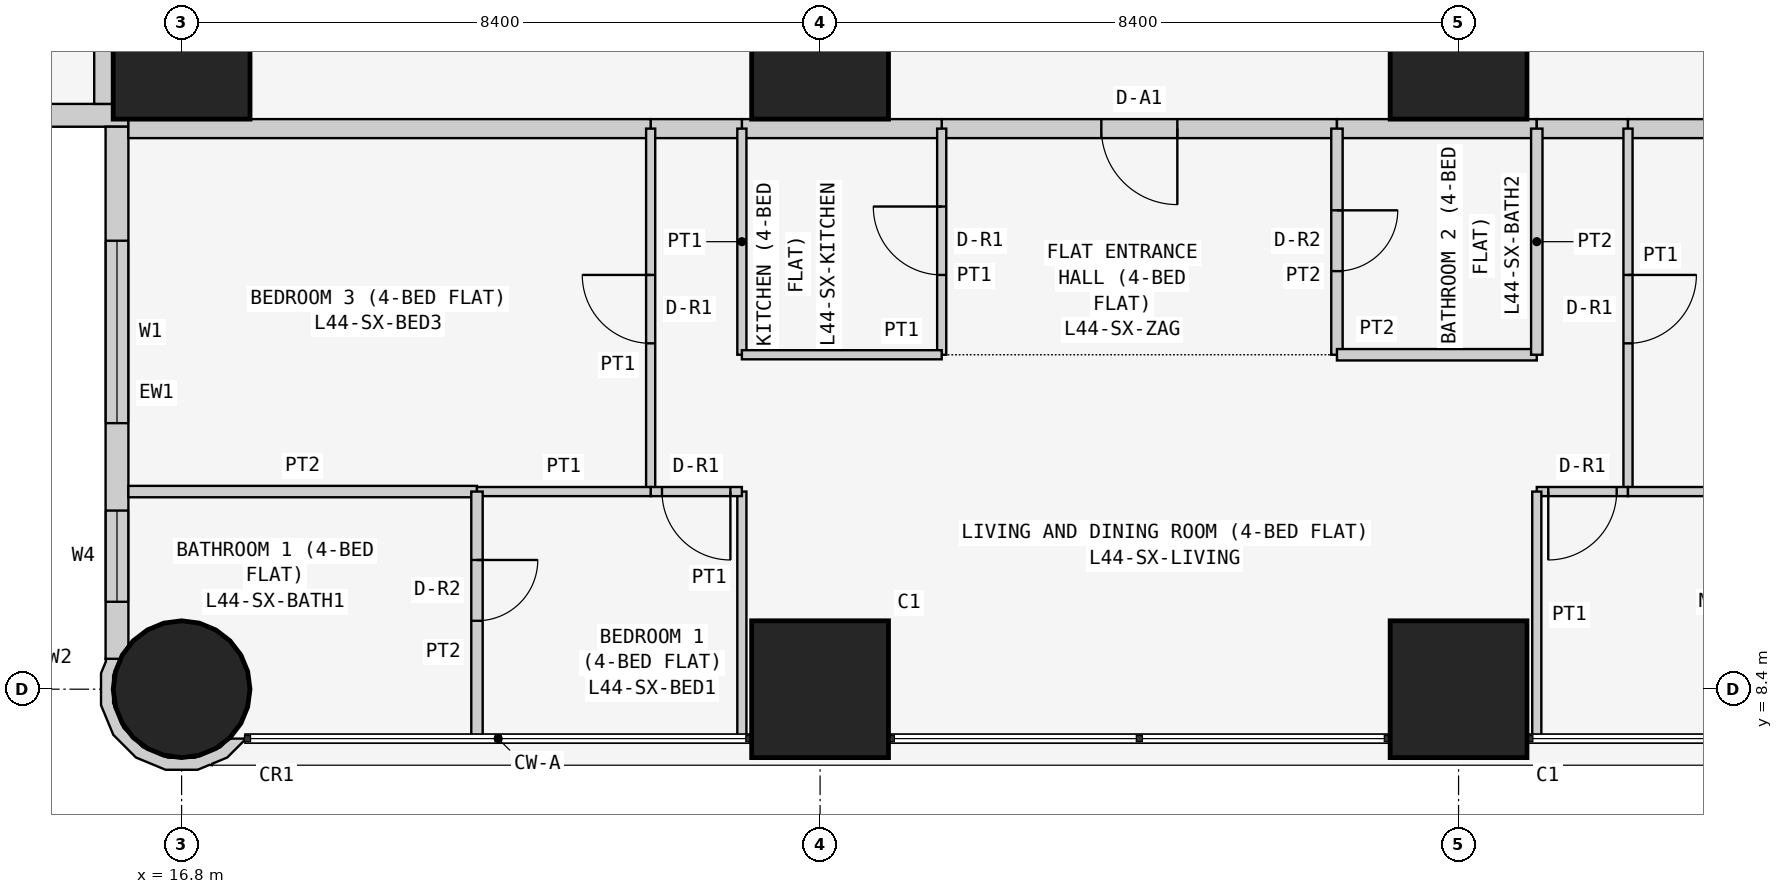
"""IFC4 building model, lengths in metres.
Left out: names, types, materials, properties, quantities, classifications, styles, units other than length and angle.
Written with IfcOpenShell. Run it as: python <this file> out.ifc"""

import sys

from ifc_helpers import new_model, si_unit, direction, frame, frame_2d, origin, origin_2d, place, context, subcontext, project, spatial, polyline, rectangle, circle, outline, extrude, element, fill, save


model = new_model("IFC4")
c1 = context("Model", 3, precision=1e-05, world=origin(), true_north=direction((0.0, 1.0)))
c2 = subcontext(c1, "Body", "Model", "MODEL_VIEW")
j1 = project(units=[si_unit("LENGTHUNIT", "METRE"), si_unit("PLANEANGLEUNIT", "RADIAN")], contexts=[c1])
p1 = place(None, origin())
s1 = spatial("IfcSite", under=j1, at=p1, CompositionType="ELEMENT")
p2 = place(p1, origin())
s2 = spatial("IfcBuilding", under=s1, at=p2, CompositionType="ELEMENT")
p3 = place(p2, frame((0.0, 0.0, 170.1)))
s3 = spatial("IfcBuildingStorey", under=s2, at=p3, CompositionType="ELEMENT", Elevation=170.1)
p4 = place(p3, frame((16.8, 8.4, 0.0), z_axis=(0.0, 0.0, 1.0), x_axis=(1.0, 0.0, 0.0)))
e1 = element("IfcColumn", 1, at=p4, inside=s3, PredefinedType="COLUMN", context=c2, shape_type="SweptSolid", body=[
    extrude(circle(Radius=0.9, at=origin_2d()), origin(), (0.0, 0.0, 1.0), 3.6),
])
for number, where, z_axis, x_axis in (
    (2, (16.8, 16.8, 0.0), (0.0, 0.0, 1.0), (1.0, 0.0, 0.0)),
    (3, (25.2, 8.4, 0.0), (0.0, 0.0, 1.0), (1.0, 0.0, 0.0)),
    (4, (25.2, 16.8, 0.0), (0.0, 0.0, 1.0), (1.0, 0.0, 0.0)),
    (5, (33.6, 8.4, 0.0), (0.0, 0.0, 1.0), (1.0, 0.0, 0.0)),
    (6, (33.6, 16.8, 0.0), (0.0, 0.0, 1.0), (1.0, 0.0, 0.0)),
):
    element("IfcColumn", number, at=place(p3, frame(where, z_axis=z_axis, x_axis=x_axis)), inside=s3, PredefinedType="COLUMN", context=c2, shape_type="SweptSolid", body=[
        extrude(rectangle(XDim=1.8, YDim=1.8, at=origin_2d()), origin(), (0.0, 0.0, 1.0), 3.6),
    ])
p5 = place(p3, frame((0.4, 15.95, 0.0), z_axis=(0.0, 0.0, 1.0), x_axis=(1.0, 0.0, 0.0)))
e7 = element("IfcWall", 7, at=p5, inside=s3, PredefinedType="SOLIDWALL", context=c2, shape_type="SweptSolid", body=[
    extrude(rectangle(XDim=15.7, YDim=0.3, at=frame_2d((7.85, 0.0))), origin(), (0.0, 0.0, 1.0), 3.45),
])
p6 = place(p5, frame((12.4, 0.0, 0.9)))
e8 = element("IfcOpeningElement", 8, at=p6, cuts=e7, PredefinedType="OPENING", context=c2, shape_type="SweptSolid", body=[
    extrude(rectangle(XDim=1.8, YDim=1.5, at=frame_2d((0.9, 0.75))), frame((0.0, 0.16, 0.0), z_axis=(0.0, -1.0, 0.0), x_axis=(1.0, 0.0, 0.0)), (0.0, 0.0, 1.0), 0.32),
])
p7 = place(p5, frame((9.55, 0.0, 1.5)))
e9 = element("IfcOpeningElement", 9, at=p7, cuts=e7, PredefinedType="OPENING", context=c2, shape_type="SweptSolid", body=[
    extrude(rectangle(XDim=0.9, YDim=0.7, at=frame_2d((0.45, 0.35))), frame((0.0, 0.16, 0.0), z_axis=(0.0, -1.0, 0.0), x_axis=(1.0, 0.0, 0.0)), (0.0, 0.0, 1.0), 0.32),
])
p8 = place(p5, frame((5.1, 0.0, 0.9)))
e10 = element("IfcOpeningElement", 10, at=p8, cuts=e7, PredefinedType="OPENING", context=c2, shape_type="SweptSolid", body=[
    extrude(rectangle(XDim=1.8, YDim=1.5, at=frame_2d((0.9, 0.75))), frame((0.0, 0.16, 0.0), z_axis=(0.0, -1.0, 0.0), x_axis=(1.0, 0.0, 0.0)), (0.0, 0.0, 1.0), 0.32),
])
p9 = place(p5, frame((2.0, 0.0, 0.0)))
e11 = element("IfcOpeningElement", 11, at=p9, cuts=e7, PredefinedType="OPENING", context=c2, shape_type="SweptSolid", body=[
    extrude(rectangle(XDim=0.9, YDim=2.4, at=frame_2d((0.45, 1.2))), frame((0.0, 0.16, 0.0), z_axis=(0.0, -1.0, 0.0), x_axis=(1.0, 0.0, 0.0)), (0.0, 0.0, 1.0), 0.32),
])
p10 = place(p5, frame((0.7, 0.0, 0.9)))
e12 = element("IfcOpeningElement", 12, at=p10, cuts=e7, PredefinedType="OPENING", context=c2, shape_type="SweptSolid", body=[
    extrude(rectangle(XDim=1.2, YDim=1.5, at=frame_2d((0.6, 0.75))), frame((0.0, 0.16, 0.0), z_axis=(0.0, -1.0, 0.0), x_axis=(1.0, 0.0, 0.0)), (0.0, 0.0, 1.0), 0.32),
])
p11 = place(p3, frame((15.95, 15.8, 0.0), z_axis=(0.0, 0.0, 1.0), x_axis=(0.0, -1.0, 0.0)))
e13 = element("IfcWall", 13, at=p11, inside=s3, PredefinedType="SOLIDWALL", context=c2, shape_type="SweptSolid", body=[
    extrude(rectangle(XDim=7.0, YDim=0.3, at=frame_2d((3.5, 0.0))), origin(), (0.0, 0.0, 1.0), 3.45),
])
p12 = place(p11, frame((1.5, 0.0, 0.9)))
e14 = element("IfcOpeningElement", 14, at=p12, cuts=e13, PredefinedType="OPENING", context=c2, shape_type="SweptSolid", body=[
    extrude(rectangle(XDim=2.4, YDim=1.5, at=frame_2d((1.2, 0.75))), frame((0.0, 0.16, 0.0), z_axis=(0.0, -1.0, 0.0), x_axis=(1.0, 0.0, 0.0)), (0.0, 0.0, 1.0), 0.32),
])
p13 = place(p11, frame((5.05, 0.0, 0.9)))
e15 = element("IfcOpeningElement", 15, at=p13, cuts=e13, PredefinedType="OPENING", context=c2, shape_type="SweptSolid", body=[
    extrude(rectangle(XDim=1.2, YDim=1.5, at=frame_2d((0.6, 0.75))), frame((0.0, 0.16, 0.0), z_axis=(0.0, -1.0, 0.0), x_axis=(1.0, 0.0, 0.0)), (0.0, 0.0, 1.0), 0.32),
])
p14 = place(p3, frame((15.89, 8.764, 0.0), z_axis=(0.0, 0.0, 1.0), x_axis=(-0.377204953059, -0.926129809145, 0.0)))
e16 = element("IfcWall", 16, at=p14, inside=s3, PredefinedType="SOLIDWALL", context=c2, shape_type="SweptSolid", body=[
    extrude(outline(polyline([(0.36, 1.803), (0.509, 1.741), (0.761, 1.486), (0.896, 1.154), (0.894, 0.795), (0.755, 0.465), (0.5, 0.213), (0.168, 0.078), (-0.1, 0.08), (0.001, -0.097), (0.03, -0.08), (0.198, -0.081), (0.589, 0.078), (0.889, 0.374), (1.052, 0.763), (1.055, 1.184), (0.896, 1.575), (0.778, 1.695), (0.769, 1.728), (0.75, 1.723), (0.6, 1.875), (0.295, 2.004), (0.281, 1.998), (0.36, 1.803)])), origin(), (0.0, 0.0, 1.0), 3.45),
])
p15 = place(p3, frame((32.0, 15.775, 0.0), z_axis=(0.0, 0.0, 1.0), x_axis=(-1.0, 0.0, 0.0)))
e17 = element("IfcWall", 17, at=p15, inside=s3, PredefinedType="PARTITIONING", context=c2, shape_type="SweptSolid", body=[
    extrude(rectangle(XDim=5.2, YDim=0.25, at=frame_2d((2.6, 0.0))), origin(), (0.0, 0.0, 1.0), 3.45),
])
p16 = place(p15, frame((2.1, 0.0, 0.0)))
e18 = element("IfcOpeningElement", 18, at=p16, cuts=e17, PredefinedType="OPENING", context=c2, shape_type="SweptSolid", body=[
    extrude(rectangle(XDim=1.0, YDim=2.1, at=frame_2d((0.5, 1.05))), frame((0.0, 0.135, 0.0), z_axis=(0.0, -1.0, 0.0), x_axis=(1.0, 0.0, 0.0)), (0.0, 0.0, 1.0), 0.27),
])
p17 = place(p3, frame((34.629, 15.775, 0.0), z_axis=(0.0, 0.0, 1.0), x_axis=(-1.0, 0.0, 0.0)))
e19 = element("IfcWall", 19, at=p17, inside=s3, PredefinedType="PARTITIONING", context=c2, shape_type="SweptSolid", body=[
    extrude(rectangle(XDim=2.629, YDim=0.25, at=frame_2d((1.314, 0.0))), origin(), (0.0, 0.0, 1.0), 3.45),
])
p18 = place(p3, frame((26.8, 15.775, 0.0), z_axis=(0.0, 0.0, 1.0), x_axis=(-1.0, 0.0, 0.0)))
e20 = element("IfcWall", 20, at=p18, inside=s3, PredefinedType="PARTITIONING", context=c2, shape_type="SweptSolid", body=[
    extrude(rectangle(XDim=2.629, YDim=0.25, at=frame_2d((1.314, 0.0))), origin(), (0.0, 0.0, 1.0), 3.45),
])
p19 = place(p3, frame((24.171, 15.775, 0.0), z_axis=(0.0, 0.0, 1.0), x_axis=(-1.0, 0.0, 0.0)))
e21 = element("IfcWall", 21, at=p19, inside=s3, PredefinedType="PARTITIONING", context=c2, shape_type="SweptSolid", body=[
    extrude(rectangle(XDim=1.2, YDim=0.25, at=frame_2d((0.6, 0.0))), origin(), (0.0, 0.0, 1.0), 3.45),
])
p20 = place(p3, frame((35.829, 15.775, 0.0), z_axis=(0.0, 0.0, 1.0), x_axis=(-1.0, 0.0, 0.0)))
e22 = element("IfcWall", 22, at=p20, inside=s3, PredefinedType="PARTITIONING", context=c2, shape_type="SweptSolid", body=[
    extrude(rectangle(XDim=1.2, YDim=0.25, at=frame_2d((0.6, 0.0))), origin(), (0.0, 0.0, 1.0), 3.45),
])
for number, where, z_axis, x_axis in (
    (23, (42.7, 15.775, 0.0), (0.0, 0.0, 1.0), (-1.0, 0.0, 0.0)),
    (24, (22.971, 15.775, 0.0), (0.0, 0.0, 1.0), (-1.0, 0.0, 0.0)),
    (25, (15.775, 16.1, 0.0), (0.0, 0.0, 1.0), (0.0, 1.0, 0.0)),
):
    element("IfcWall", number, at=place(p3, frame(where, z_axis=z_axis, x_axis=x_axis)), inside=s3, PredefinedType="PARTITIONING", context=c2, shape_type="SweptSolid", body=[
        extrude(rectangle(XDim=6.871, YDim=0.25, at=frame_2d((3.436, 0.0))), origin(), (0.0, 0.0, 1.0), 3.45),
    ])
p21 = place(p3, frame((32.0, 12.8, 0.0), z_axis=(0.0, 0.0, 1.0), x_axis=(0.0, 1.0, 0.0)))
e26 = element("IfcWall", 26, at=p21, inside=s3, PredefinedType="PARTITIONING", context=c2, shape_type="SweptSolid", body=[
    extrude(rectangle(XDim=2.975, YDim=0.15, at=frame_2d((1.487, 0.0))), origin(), (0.0, 0.0, 1.0), 3.45),
])
p22 = place(p21, frame((1.1, 0.0, 0.0)))
e27 = element("IfcOpeningElement", 27, at=p22, cuts=e26, PredefinedType="OPENING", context=c2, shape_type="SweptSolid", body=[
    extrude(rectangle(XDim=0.8, YDim=2.1, at=frame_2d((0.4, 1.05))), frame((0.0, 0.085, 0.0), z_axis=(0.0, -1.0, 0.0), x_axis=(1.0, 0.0, 0.0)), (0.0, 0.0, 1.0), 0.17),
])
p23 = place(p3, frame((26.8, 15.775, 0.0), z_axis=(0.0, 0.0, 1.0), x_axis=(0.0, -1.0, 0.0)))
e28 = element("IfcWall", 28, at=p23, inside=s3, PredefinedType="PARTITIONING", context=c2, shape_type="SweptSolid", body=[
    extrude(rectangle(XDim=2.975, YDim=0.12, at=frame_2d((1.487, 0.0))), origin(), (0.0, 0.0, 1.0), 3.45),
])
p24 = place(p23, frame((1.025, 0.0, 0.0)))
e29 = element("IfcOpeningElement", 29, at=p24, cuts=e28, PredefinedType="OPENING", context=c2, shape_type="SweptSolid", body=[
    extrude(rectangle(XDim=0.9, YDim=2.1, at=frame_2d((0.45, 1.05))), frame((0.0, 0.07, 0.0), z_axis=(0.0, -1.0, 0.0), x_axis=(1.0, 0.0, 0.0)), (0.0, 0.0, 1.0), 0.14),
])
p25 = place(p3, frame((32.0, 12.8, 0.0), z_axis=(0.0, 0.0, 1.0), x_axis=(1.0, 0.0, 0.0)))
e30 = element("IfcWall", 30, at=p25, inside=s3, PredefinedType="PARTITIONING", context=c2, shape_type="SweptSolid", body=[
    extrude(rectangle(XDim=2.629, YDim=0.15, at=frame_2d((1.314, 0.0))), origin(), (0.0, 0.0, 1.0), 3.45),
])
p26 = place(p3, frame((34.629, 12.8, 0.0), z_axis=(0.0, 0.0, 1.0), x_axis=(0.0, 1.0, 0.0)))
e31 = element("IfcWall", 31, at=p26, inside=s3, PredefinedType="PARTITIONING", context=c2, shape_type="SweptSolid", body=[
    extrude(rectangle(XDim=2.975, YDim=0.15, at=frame_2d((1.487, 0.0))), origin(), (0.0, 0.0, 1.0), 3.45),
])
p27 = place(p3, frame((24.171, 15.775, 0.0), z_axis=(0.0, 0.0, 1.0), x_axis=(0.0, -1.0, 0.0)))
e32 = element("IfcWall", 32, at=p27, inside=s3, PredefinedType="PARTITIONING", context=c2, shape_type="SweptSolid", body=[
    extrude(rectangle(XDim=2.975, YDim=0.12, at=frame_2d((1.487, 0.0))), origin(), (0.0, 0.0, 1.0), 3.45),
])
p28 = place(p3, frame((24.171, 12.8, 0.0), z_axis=(0.0, 0.0, 1.0), x_axis=(1.0, 0.0, 0.0)))
e33 = element("IfcWall", 33, at=p28, inside=s3, PredefinedType="PARTITIONING", context=c2, shape_type="SweptSolid", body=[
    extrude(rectangle(XDim=2.629, YDim=0.12, at=frame_2d((1.314, 0.0))), origin(), (0.0, 0.0, 1.0), 3.45),
])
p29 = place(p3, frame((35.829, 15.775, 0.0), z_axis=(0.0, 0.0, 1.0), x_axis=(0.0, -1.0, 0.0)))
e34 = element("IfcWall", 34, at=p29, inside=s3, PredefinedType="PARTITIONING", context=c2, shape_type="SweptSolid", body=[
    extrude(rectangle(XDim=4.775, YDim=0.12, at=frame_2d((2.387, 0.0))), origin(), (0.0, 0.0, 1.0), 3.45),
])
p30 = place(p29, frame((1.925, 0.0, 0.0)))
e35 = element("IfcOpeningElement", 35, at=p30, cuts=e34, PredefinedType="OPENING", context=c2, shape_type="SweptSolid", body=[
    extrude(rectangle(XDim=0.9, YDim=2.1, at=frame_2d((0.45, 1.05))), frame((0.0, 0.07, 0.0), z_axis=(0.0, -1.0, 0.0), x_axis=(1.0, 0.0, 0.0)), (0.0, 0.0, 1.0), 0.14),
])
p31 = place(p3, frame((35.829, 11.0, 0.0), z_axis=(0.0, 0.0, 1.0), x_axis=(-1.0, 0.0, 0.0)))
e36 = element("IfcWall", 36, at=p31, inside=s3, PredefinedType="PARTITIONING", context=c2, shape_type="SweptSolid", body=[
    extrude(rectangle(XDim=1.2, YDim=0.12, at=frame_2d((0.6, 0.0))), origin(), (0.0, 0.0, 1.0), 3.45),
])
p32 = place(p31, frame((0.149, 0.0, 0.0)))
e37 = element("IfcOpeningElement", 37, at=p32, cuts=e36, PredefinedType="OPENING", context=c2, shape_type="SweptSolid", body=[
    extrude(rectangle(XDim=0.9, YDim=2.1, at=frame_2d((0.45, 1.05))), frame((0.0, 0.07, 0.0), z_axis=(0.0, -1.0, 0.0), x_axis=(1.0, 0.0, 0.0)), (0.0, 0.0, 1.0), 0.14),
])
p33 = place(p3, frame((34.629, 11.0, 0.0), z_axis=(0.0, 0.0, 1.0), x_axis=(0.0, -1.0, 0.0)))
e38 = element("IfcWall", 38, at=p33, inside=s3, PredefinedType="PARTITIONING", context=c2, shape_type="SweptSolid", body=[
    extrude(rectangle(XDim=3.25, YDim=0.12, at=frame_2d((1.625, 0.0))), origin(), (0.0, 0.0, 1.0), 3.45),
])
p34 = place(p3, frame((22.971, 11.0, 0.0), z_axis=(0.0, 0.0, 1.0), x_axis=(0.0, 1.0, 0.0)))
e39 = element("IfcWall", 39, at=p34, inside=s3, PredefinedType="PARTITIONING", context=c2, shape_type="SweptSolid", body=[
    extrude(rectangle(XDim=4.775, YDim=0.12, at=frame_2d((2.387, 0.0))), origin(), (0.0, 0.0, 1.0), 3.45),
])
p35 = place(p34, frame((1.95, 0.0, 0.0)))
e40 = element("IfcOpeningElement", 40, at=p35, cuts=e39, PredefinedType="OPENING", context=c2, shape_type="SweptSolid", body=[
    extrude(rectangle(XDim=0.9, YDim=2.1, at=frame_2d((0.45, 1.05))), frame((0.0, 0.07, 0.0), z_axis=(0.0, -1.0, 0.0), x_axis=(1.0, 0.0, 0.0)), (0.0, 0.0, 1.0), 0.14),
])
p36 = place(p3, frame((24.171, 7.75, 0.0), z_axis=(0.0, 0.0, 1.0), x_axis=(0.0, 1.0, 0.0)))
e41 = element("IfcWall", 41, at=p36, inside=s3, PredefinedType="PARTITIONING", context=c2, shape_type="SweptSolid", body=[
    extrude(rectangle(XDim=3.25, YDim=0.12, at=frame_2d((1.625, 0.0))), origin(), (0.0, 0.0, 1.0), 3.45),
])
p37 = place(p3, frame((24.171, 11.0, 0.0), z_axis=(0.0, 0.0, 1.0), x_axis=(-1.0, 0.0, 0.0)))
e42 = element("IfcWall", 42, at=p37, inside=s3, PredefinedType="PARTITIONING", context=c2, shape_type="SweptSolid", body=[
    extrude(rectangle(XDim=1.2, YDim=0.12, at=frame_2d((0.6, 0.0))), origin(), (0.0, 0.0, 1.0), 3.45),
])
p38 = place(p37, frame((0.151, 0.0, 0.0)))
e43 = element("IfcOpeningElement", 43, at=p38, cuts=e42, PredefinedType="OPENING", context=c2, shape_type="SweptSolid", body=[
    extrude(rectangle(XDim=0.9, YDim=2.1, at=frame_2d((0.45, 1.05))), frame((0.0, 0.07, 0.0), z_axis=(0.0, -1.0, 0.0), x_axis=(1.0, 0.0, 0.0)), (0.0, 0.0, 1.0), 0.14),
])
p39 = place(p3, frame((35.829, 11.0, 0.0), z_axis=(0.0, 0.0, 1.0), x_axis=(1.0, 0.0, 0.0)))
e44 = element("IfcWall", 44, at=p39, inside=s3, PredefinedType="PARTITIONING", context=c2, shape_type="SweptSolid", body=[
    extrude(rectangle(XDim=6.871, YDim=0.12, at=frame_2d((3.436, 0.0))), origin(), (0.0, 0.0, 1.0), 3.45),
])
p40 = place(p3, frame((16.1, 11.0, 0.0), z_axis=(0.0, 0.0, 1.0), x_axis=(1.0, 0.0, 0.0)))
e45 = element("IfcWall", 45, at=p40, inside=s3, PredefinedType="PARTITIONING", context=c2, shape_type="SweptSolid", body=[
    extrude(rectangle(XDim=4.586, YDim=0.15, at=frame_2d((2.293, 0.0))), origin(), (0.0, 0.0, 1.0), 3.45),
])
p41 = place(p3, frame((20.686, 11.0, 0.0), z_axis=(0.0, 0.0, 1.0), x_axis=(1.0, 0.0, 0.0)))
e46 = element("IfcWall", 46, at=p41, inside=s3, PredefinedType="PARTITIONING", context=c2, shape_type="SweptSolid", body=[
    extrude(rectangle(XDim=2.285, YDim=0.12, at=frame_2d((1.143, 0.0))), origin(), (0.0, 0.0, 1.0), 3.45),
])
p42 = place(p3, frame((20.686, 7.75, 0.0), z_axis=(0.0, 0.0, 1.0), x_axis=(0.0, 1.0, 0.0)))
e47 = element("IfcWall", 47, at=p42, inside=s3, PredefinedType="PARTITIONING", context=c2, shape_type="SweptSolid", body=[
    extrude(rectangle(XDim=3.25, YDim=0.15, at=frame_2d((1.625, 0.0))), origin(), (0.0, 0.0, 1.0), 3.45),
])
p43 = place(p42, frame((1.55, 0.0, 0.0)))
e48 = element("IfcOpeningElement", 48, at=p43, cuts=e47, PredefinedType="OPENING", context=c2, shape_type="SweptSolid", body=[
    extrude(rectangle(XDim=0.8, YDim=2.1, at=frame_2d((0.4, 1.05))), frame((0.0, 0.085, 0.0), z_axis=(0.0, -1.0, 0.0), x_axis=(1.0, 0.0, 0.0)), (0.0, 0.0, 1.0), 0.17),
])
p44 = place(p12, origin())
e49 = element("IfcWindow", 49, at=p44, inside=s3, PartitioningType="SINGLE_PANEL", PredefinedType="WINDOW", context=c2, shape_type="SweptSolid", body=[
    extrude(rectangle(XDim=2.4, YDim=1.5, at=frame_2d((1.2, 0.75))), frame((0.0, 0.03, 0.0), z_axis=(0.0, -1.0, 0.0), x_axis=(1.0, 0.0, 0.0)), (0.0, 0.0, 1.0), 0.06),
])
fill(e14, e49)
p45 = place(p13, origin())
e50 = element("IfcWindow", 50, at=p45, inside=s3, PartitioningType="SINGLE_PANEL", PredefinedType="WINDOW", context=c2, shape_type="SweptSolid", body=[
    extrude(rectangle(XDim=1.2, YDim=1.5, at=frame_2d((0.6, 0.75))), frame((0.0, 0.03, 0.0), z_axis=(0.0, -1.0, 0.0), x_axis=(1.0, 0.0, 0.0)), (0.0, 0.0, 1.0), 0.06),
])
fill(e15, e50)
p46 = place(p16, origin())
e51 = element("IfcDoor", 51, at=p46, inside=s3, OperationType="SINGLE_SWING_LEFT", PredefinedType="DOOR", context=c2, shape_type="SweptSolid", body=[
    extrude(rectangle(XDim=1.0, YDim=2.1, at=frame_2d((0.5, 1.05))), frame((0.0, 0.025, 0.0), z_axis=(0.0, -1.0, 0.0), x_axis=(1.0, 0.0, 0.0)), (0.0, 0.0, 1.0), 0.05),
])
fill(e18, e51)
p47 = place(p22, frame((0.8, 0.0, 0.0), z_axis=(0.0, 0.0, 1.0), x_axis=(-1.0, 0.0, 0.0)))
e52 = element("IfcDoor", 52, at=p47, inside=s3, OperationType="SINGLE_SWING_LEFT", PredefinedType="DOOR", context=c2, shape_type="SweptSolid", body=[
    extrude(rectangle(XDim=0.8, YDim=2.1, at=frame_2d((0.4, 1.05))), frame((0.0, 0.025, 0.0), z_axis=(0.0, -1.0, 0.0), x_axis=(1.0, 0.0, 0.0)), (0.0, 0.0, 1.0), 0.05),
])
fill(e27, e52)
p48 = place(p24, frame((0.9, 0.0, 0.0), z_axis=(0.0, 0.0, 1.0), x_axis=(-1.0, 0.0, 0.0)))
e53 = element("IfcDoor", 53, at=p48, inside=s3, OperationType="SINGLE_SWING_RIGHT", PredefinedType="DOOR", context=c2, shape_type="SweptSolid", body=[
    extrude(rectangle(XDim=0.9, YDim=2.1, at=frame_2d((0.45, 1.05))), frame((0.0, 0.025, 0.0), z_axis=(0.0, -1.0, 0.0), x_axis=(1.0, 0.0, 0.0)), (0.0, 0.0, 1.0), 0.05),
])
fill(e29, e53)
p49 = place(p30, origin())
e54 = element("IfcDoor", 54, at=p49, inside=s3, OperationType="SINGLE_SWING_LEFT", PredefinedType="DOOR", context=c2, shape_type="SweptSolid", body=[
    extrude(rectangle(XDim=0.9, YDim=2.1, at=frame_2d((0.45, 1.05))), frame((0.0, 0.025, 0.0), z_axis=(0.0, -1.0, 0.0), x_axis=(1.0, 0.0, 0.0)), (0.0, 0.0, 1.0), 0.05),
])
fill(e35, e54)
p50 = place(p32, origin())
e55 = element("IfcDoor", 55, at=p50, inside=s3, OperationType="SINGLE_SWING_RIGHT", PredefinedType="DOOR", context=c2, shape_type="SweptSolid", body=[
    extrude(rectangle(XDim=0.9, YDim=2.1, at=frame_2d((0.45, 1.05))), frame((0.0, 0.025, 0.0), z_axis=(0.0, -1.0, 0.0), x_axis=(1.0, 0.0, 0.0)), (0.0, 0.0, 1.0), 0.05),
])
fill(e37, e55)
p51 = place(p35, origin())
e56 = element("IfcDoor", 56, at=p51, inside=s3, OperationType="SINGLE_SWING_RIGHT", PredefinedType="DOOR", context=c2, shape_type="SweptSolid", body=[
    extrude(rectangle(XDim=0.9, YDim=2.1, at=frame_2d((0.45, 1.05))), frame((0.0, 0.025, 0.0), z_axis=(0.0, -1.0, 0.0), x_axis=(1.0, 0.0, 0.0)), (0.0, 0.0, 1.0), 0.05),
])
fill(e40, e56)
p52 = place(p38, origin())
e57 = element("IfcDoor", 57, at=p52, inside=s3, OperationType="SINGLE_SWING_LEFT", PredefinedType="DOOR", context=c2, shape_type="SweptSolid", body=[
    extrude(rectangle(XDim=0.9, YDim=2.1, at=frame_2d((0.45, 1.05))), frame((0.0, 0.025, 0.0), z_axis=(0.0, -1.0, 0.0), x_axis=(1.0, 0.0, 0.0)), (0.0, 0.0, 1.0), 0.05),
])
fill(e43, e57)
p53 = place(p43, frame((0.8, 0.0, 0.0), z_axis=(0.0, 0.0, 1.0), x_axis=(-1.0, 0.0, 0.0)))
e58 = element("IfcDoor", 58, at=p53, inside=s3, OperationType="SINGLE_SWING_LEFT", PredefinedType="DOOR", context=c2, shape_type="SweptSolid", body=[
    extrude(rectangle(XDim=0.8, YDim=2.1, at=frame_2d((0.4, 1.05))), frame((0.0, 0.025, 0.0), z_axis=(0.0, -1.0, 0.0), x_axis=(1.0, 0.0, 0.0)), (0.0, 0.0, 1.0), 0.05),
])
fill(e48, e58)
save(model, sys.argv[1])
